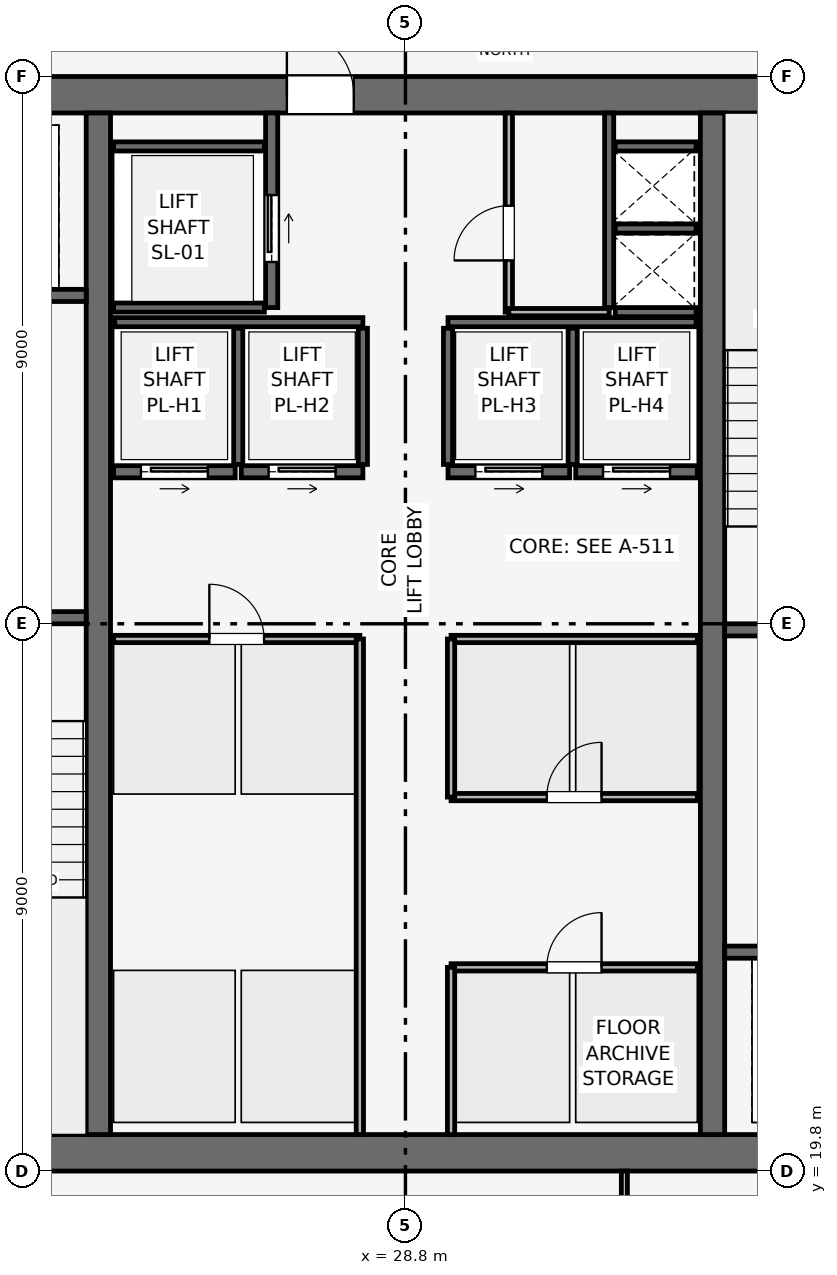
"""IFC4 building model, lengths in metres.
Left out: names, types, materials, properties, quantities, classifications, styles, units other than length and angle.
Written with IfcOpenShell. Run it as: python <this file> out.ifc"""

import sys

from ifc_helpers import new_model, si_unit, direction, frame, frame_2d, origin, place, context, subcontext, project, spatial, rectangle, extrude, element, fill, save


model = new_model("IFC4")
c1 = context("Model", 3, precision=1e-05, world=origin(), true_north=direction((0.0, 1.0)))
c2 = subcontext(c1, "Body", "Model", "MODEL_VIEW")
j1 = project(units=[si_unit("LENGTHUNIT", "METRE"), si_unit("PLANEANGLEUNIT", "RADIAN")], contexts=[c1])
p1 = place(None, origin())
s1 = spatial("IfcSite", under=j1, at=p1, CompositionType="ELEMENT")
p2 = place(p1, origin())
s2 = spatial("IfcBuilding", under=s1, at=p2, CompositionType="ELEMENT")
p3 = place(p2, frame((0.0, 0.0, 336.75)))
s3 = spatial("IfcBuildingStorey", under=s2, at=p3, CompositionType="ELEMENT", Elevation=336.75)
p4 = place(p3, frame((19.8, 20.1, 0.0), z_axis=(0.0, 0.0, 1.0), x_axis=(1.0, 0.0, 0.0)))
e1 = element("IfcWall", 1, at=p4, inside=s3, PredefinedType="SHEAR", context=c2, shape_type="SweptSolid", body=[
    extrude(rectangle(XDim=18.0, YDim=0.6, at=frame_2d((9.0, 0.0))), origin(), (0.0, 0.0, 1.0), 3.75),
])
p5 = place(p3, frame((19.8, 37.5, 0.0), z_axis=(0.0, 0.0, 1.0), x_axis=(1.0, 0.0, 0.0)))
e2 = element("IfcWall", 2, at=p5, inside=s3, PredefinedType="SHEAR", context=c2, shape_type="SweptSolid", body=[
    extrude(rectangle(XDim=18.0, YDim=0.6, at=frame_2d((9.0, 0.0))), origin(), (0.0, 0.0, 1.0), 3.75),
])
p6 = place(p5, frame((7.05, 0.0, 0.0)))
e3 = element("IfcOpeningElement", 3, at=p6, cuts=e2, PredefinedType="OPENING", context=c2, shape_type="SweptSolid", body=[
    extrude(rectangle(XDim=1.1, YDim=2.15, at=frame_2d((0.55, 1.075))), frame((0.0, 0.31, 0.0), z_axis=(0.0, -1.0, 0.0), x_axis=(1.0, 0.0, 0.0)), (0.0, 0.0, 1.0), 0.62),
])
for number, where, z_axis, x_axis in (
    (4, (23.75, 20.4, 0.0), (0.0, 0.0, 1.0), (0.0, 1.0, 0.0)),
    (5, (33.85, 20.4, 0.0), (0.0, 0.0, 1.0), (0.0, 1.0, 0.0)),
):
    element("IfcWall", number, at=place(p3, frame(where, z_axis=z_axis, x_axis=x_axis)), inside=s3, PredefinedType="SHEAR", context=c2, shape_type="SweptSolid", body=[
        extrude(rectangle(XDim=16.8, YDim=0.4, at=frame_2d((8.4, 0.0))), origin(), (0.0, 0.0, 1.0), 3.75),
    ])
p7 = place(p3, frame((20.4, 28.9, 0.0), z_axis=(0.0, 0.0, 1.0), x_axis=(1.0, 0.0, 0.0)))
e6 = element("IfcWall", 6, at=p7, inside=s3, PredefinedType="SHEAR", context=c2, shape_type="SweptSolid", body=[
    extrude(rectangle(XDim=3.15, YDim=0.2, at=frame_2d((1.575, 0.0))), origin(), (0.0, 0.0, 1.0), 3.51),
])
p8 = place(p7, frame((0.8, 0.0, 0.0)))
e7 = element("IfcOpeningElement", 7, at=p8, cuts=e6, PredefinedType="OPENING", context=c2, shape_type="SweptSolid", body=[
    extrude(rectangle(XDim=1.0, YDim=2.1, at=frame_2d((0.5, 1.05))), frame((0.0, 0.11, 0.0), z_axis=(0.0, -1.0, 0.0), x_axis=(1.0, 0.0, 0.0)), (0.0, 0.0, 1.0), 0.22),
])
p9 = place(p3, frame((34.05, 28.7, 0.0), z_axis=(0.0, 0.0, 1.0), x_axis=(1.0, 0.0, 0.0)))
e8 = element("IfcWall", 8, at=p9, inside=s3, PredefinedType="SHEAR", context=c2, shape_type="SweptSolid", body=[
    extrude(rectangle(XDim=3.15, YDim=0.2, at=frame_2d((1.575, 0.0))), origin(), (0.0, 0.0, 1.0), 3.51),
])
p10 = place(p9, frame((0.8, 0.0, 0.0)))
e9 = element("IfcOpeningElement", 9, at=p10, cuts=e8, PredefinedType="OPENING", context=c2, shape_type="SweptSolid", body=[
    extrude(rectangle(XDim=1.0, YDim=2.1, at=frame_2d((0.5, 1.05))), frame((0.0, 0.11, 0.0), z_axis=(0.0, -1.0, 0.0), x_axis=(1.0, 0.0, 0.0)), (0.0, 0.0, 1.0), 0.22),
])
p11 = place(p3, frame((32.15, 34.0, 0.0), z_axis=(0.0, 0.0, 1.0), x_axis=(0.0, 1.0, 0.0)))
e10 = element("IfcWall", 10, at=p11, inside=s3, PredefinedType="SHEAR", context=c2, shape_type="SweptSolid", body=[
    extrude(rectangle(XDim=3.2, YDim=0.15, at=frame_2d((1.6, 0.0))), origin(), (0.0, 0.0, 1.0), 3.51),
])
for number, where, z_axis, x_axis in (
    (11, (32.25, 33.925, 0.0), (0.0, 0.0, 1.0), (1.0, 0.0, 0.0)),
    (12, (32.25, 35.3, 0.0), (0.0, 0.0, 1.0), (1.0, 0.0, 0.0)),
):
    element("IfcWall", number, at=place(p3, frame(where, z_axis=z_axis, x_axis=x_axis)), inside=s3, PredefinedType="SHEAR", context=c2, shape_type="SweptSolid", body=[
        extrude(rectangle(XDim=1.33, YDim=0.15, at=frame_2d((0.665, 0.0))), origin(), (0.0, 0.0, 1.0), 3.51),
    ])
p12 = place(p3, frame((20.5, 34.2, 0.0), z_axis=(0.0, 0.0, 1.0), x_axis=(1.0, 0.0, 0.0)))
e13 = element("IfcWall", 13, at=p12, inside=s3, PredefinedType="SHEAR", context=c2, shape_type="SweptSolid", body=[
    extrude(rectangle(XDim=3.05, YDim=0.2, at=frame_2d((1.525, 0.0))), origin(), (0.0, 0.0, 1.0), 3.51),
])
p13 = place(p12, frame((0.75, 0.0, 0.0)))
e14 = element("IfcOpeningElement", 14, at=p13, cuts=e13, PredefinedType="OPENING", context=c2, shape_type="SweptSolid", body=[
    extrude(rectangle(XDim=1.1, YDim=2.15, at=frame_2d((0.55, 1.075))), frame((0.0, 0.11, 0.0), z_axis=(0.0, -1.0, 0.0), x_axis=(1.0, 0.0, 0.0)), (0.0, 0.0, 1.0), 0.22),
])
p14 = place(p3, frame((34.05, 23.4, 0.0), z_axis=(0.0, 0.0, 1.0), x_axis=(1.0, 0.0, 0.0)))
e15 = element("IfcWall", 15, at=p14, inside=s3, PredefinedType="SHEAR", context=c2, shape_type="SweptSolid", body=[
    extrude(rectangle(XDim=3.05, YDim=0.2, at=frame_2d((1.525, 0.0))), origin(), (0.0, 0.0, 1.0), 3.51),
])
p15 = place(p14, frame((1.2, 0.0, 0.0)))
e16 = element("IfcOpeningElement", 16, at=p15, cuts=e15, PredefinedType="OPENING", context=c2, shape_type="SweptSolid", body=[
    extrude(rectangle(XDim=1.1, YDim=2.15, at=frame_2d((0.55, 1.075))), frame((0.0, 0.11, 0.0), z_axis=(0.0, -1.0, 0.0), x_axis=(1.0, 0.0, 0.0)), (0.0, 0.0, 1.0), 0.22),
])
p16 = place(p3, frame((26.6, 34.0, 0.0), z_axis=(0.0, 0.0, 1.0), x_axis=(0.0, 1.0, 0.0)))
e17 = element("IfcWall", 17, at=p16, inside=s3, PredefinedType="SHEAR", context=c2, shape_type="SweptSolid", body=[
    extrude(rectangle(XDim=3.2, YDim=0.2, at=frame_2d((1.6, 0.0))), origin(), (0.0, 0.0, 1.0), 3.51),
])
p17 = place(p16, frame((0.75, 0.0, 0.0)))
e18 = element("IfcOpeningElement", 18, at=p17, cuts=e17, PredefinedType="OPENING", context=c2, shape_type="SweptSolid", body=[
    extrude(rectangle(XDim=1.1, YDim=2.15, at=frame_2d((0.55, 1.075))), frame((0.0, 0.11, 0.0), z_axis=(0.0, -1.0, 0.0), x_axis=(1.0, 0.0, 0.0)), (0.0, 0.0, 1.0), 0.22),
])
for number, where, z_axis, x_axis in (
    (19, (24.0, 34.0, 0.0), (0.0, 0.0, 1.0), (1.0, 0.0, 0.0)),
    (20, (24.0, 36.65, 0.0), (0.0, 0.0, 1.0), (1.0, 0.0, 0.0)),
):
    element("IfcWall", number, at=place(p3, frame(where, z_axis=z_axis, x_axis=x_axis)), inside=s3, PredefinedType="SHEAR", context=c2, shape_type="SweptSolid", body=[
        extrude(rectangle(XDim=2.48, YDim=0.15, at=frame_2d((1.24, 0.0))), origin(), (0.0, 0.0, 1.0), 3.51),
    ])
p18 = place(p3, frame((24.0, 31.3, 0.0), z_axis=(0.0, 0.0, 1.0), x_axis=(1.0, 0.0, 0.0)))
e21 = element("IfcWall", 21, at=p18, inside=s3, PredefinedType="SHEAR", context=c2, shape_type="SweptSolid", body=[
    extrude(rectangle(XDim=2.0, YDim=0.2, at=frame_2d((1.0, 0.0))), origin(), (0.0, 0.0, 1.0), 3.51),
])
p19 = place(p18, frame((0.45, 0.0, 0.0)))
e22 = element("IfcOpeningElement", 22, at=p19, cuts=e21, PredefinedType="OPENING", context=c2, shape_type="SweptSolid", body=[
    extrude(rectangle(XDim=1.1, YDim=2.15, at=frame_2d((0.55, 1.075))), frame((0.0, 0.11, 0.0), z_axis=(0.0, -1.0, 0.0), x_axis=(1.0, 0.0, 0.0)), (0.0, 0.0, 1.0), 0.22),
])
p20 = place(p3, frame((26.1, 31.3, 0.0), z_axis=(0.0, 0.0, 1.0), x_axis=(1.0, 0.0, 0.0)))
e23 = element("IfcWall", 23, at=p20, inside=s3, PredefinedType="SHEAR", context=c2, shape_type="SweptSolid", body=[
    extrude(rectangle(XDim=2.0, YDim=0.2, at=frame_2d((1.0, 0.0))), origin(), (0.0, 0.0, 1.0), 3.51),
])
p21 = place(p20, frame((0.45, 0.0, 0.0)))
e24 = element("IfcOpeningElement", 24, at=p21, cuts=e23, PredefinedType="OPENING", context=c2, shape_type="SweptSolid", body=[
    extrude(rectangle(XDim=1.1, YDim=2.15, at=frame_2d((0.55, 1.075))), frame((0.0, 0.11, 0.0), z_axis=(0.0, -1.0, 0.0), x_axis=(1.0, 0.0, 0.0)), (0.0, 0.0, 1.0), 0.22),
])
p22 = place(p3, frame((29.5, 31.3, 0.0), z_axis=(0.0, 0.0, 1.0), x_axis=(1.0, 0.0, 0.0)))
e25 = element("IfcWall", 25, at=p22, inside=s3, PredefinedType="SHEAR", context=c2, shape_type="SweptSolid", body=[
    extrude(rectangle(XDim=2.0, YDim=0.2, at=frame_2d((1.0, 0.0))), origin(), (0.0, 0.0, 1.0), 3.51),
])
p23 = place(p22, frame((0.45, 0.0, 0.0)))
e26 = element("IfcOpeningElement", 26, at=p23, cuts=e25, PredefinedType="OPENING", context=c2, shape_type="SweptSolid", body=[
    extrude(rectangle(XDim=1.1, YDim=2.15, at=frame_2d((0.55, 1.075))), frame((0.0, 0.11, 0.0), z_axis=(0.0, -1.0, 0.0), x_axis=(1.0, 0.0, 0.0)), (0.0, 0.0, 1.0), 0.22),
])
p24 = place(p3, frame((31.6, 31.3, 0.0), z_axis=(0.0, 0.0, 1.0), x_axis=(1.0, 0.0, 0.0)))
e27 = element("IfcWall", 27, at=p24, inside=s3, PredefinedType="SHEAR", context=c2, shape_type="SweptSolid", body=[
    extrude(rectangle(XDim=2.0, YDim=0.2, at=frame_2d((1.0, 0.0))), origin(), (0.0, 0.0, 1.0), 3.51),
])
p25 = place(p24, frame((0.45, 0.0, 0.0)))
e28 = element("IfcOpeningElement", 28, at=p25, cuts=e27, PredefinedType="OPENING", context=c2, shape_type="SweptSolid", body=[
    extrude(rectangle(XDim=1.1, YDim=2.15, at=frame_2d((0.55, 1.075))), frame((0.0, 0.11, 0.0), z_axis=(0.0, -1.0, 0.0), x_axis=(1.0, 0.0, 0.0)), (0.0, 0.0, 1.0), 0.22),
])
p26 = place(p3, frame((32.25, 36.65, 0.0), z_axis=(0.0, 0.0, 1.0), x_axis=(1.0, 0.0, 0.0)))
e29 = element("IfcWall", 29, at=p26, inside=s3, PredefinedType="SHEAR", context=c2, shape_type="SweptSolid", body=[
    extrude(rectangle(XDim=1.33, YDim=0.15, at=frame_2d((0.665, 0.0))), origin(), (0.0, 0.0, 1.0), 3.51),
])
for number, where, z_axis, x_axis in (
    (30, (24.02, 33.76, 0.0), (0.0, 0.0, 1.0), (1.0, 0.0, 0.0)),
    (31, (29.5, 33.76, 0.0), (0.0, 0.0, 1.0), (1.0, 0.0, 0.0)),
):
    element("IfcWall", number, at=place(p3, frame(where, z_axis=z_axis, x_axis=x_axis)), inside=s3, PredefinedType="SHEAR", context=c2, shape_type="SweptSolid", body=[
        extrude(rectangle(XDim=4.08, YDim=0.15, at=frame_2d((2.04, 0.0))), origin(), (0.0, 0.0, 1.0), 3.51),
    ])
for number, where, z_axis, x_axis in (
    (32, (26.05, 31.42, 0.0), (0.0, 0.0, 1.0), (0.0, 1.0, 0.0)),
    (33, (28.1, 31.42, 0.0), (0.0, 0.0, 1.0), (0.0, 1.0, 0.0)),
    (34, (29.5, 31.42, 0.0), (0.0, 0.0, 1.0), (0.0, 1.0, 0.0)),
    (35, (31.55, 31.42, 0.0), (0.0, 0.0, 1.0), (0.0, 1.0, 0.0)),
):
    element("IfcWall", number, at=place(p3, frame(where, z_axis=z_axis, x_axis=x_axis)), inside=s3, PredefinedType="SHEAR", context=c2, shape_type="SweptSolid", body=[
        extrude(rectangle(XDim=2.24, YDim=0.15, at=frame_2d((1.12, 0.0))), origin(), (0.0, 0.0, 1.0), 3.51),
    ])
p27 = place(p3, frame((30.5, 33.925, 0.0), z_axis=(0.0, 0.0, 1.0), x_axis=(0.0, 1.0, 0.0)))
e36 = element("IfcWall", 36, at=p27, inside=s3, PredefinedType="PARTITIONING", context=c2, shape_type="SweptSolid", body=[
    extrude(rectangle(XDim=3.275, YDim=0.12, at=frame_2d((1.637, 0.0))), origin(), (0.0, 0.0, 1.0), 3.51),
])
p28 = place(p27, frame((0.85, 0.0, 0.0)))
e37 = element("IfcOpeningElement", 37, at=p28, cuts=e36, PredefinedType="OPENING", context=c2, shape_type="SweptSolid", body=[
    extrude(rectangle(XDim=0.9, YDim=2.1, at=frame_2d((0.45, 1.05))), frame((0.0, 0.07, 0.0), z_axis=(0.0, -1.0, 0.0), x_axis=(1.0, 0.0, 0.0)), (0.0, 0.0, 1.0), 0.14),
])
p29 = place(p3, frame((30.5, 33.925, 0.0), z_axis=(0.0, 0.0, 1.0), x_axis=(1.0, 0.0, 0.0)))
e38 = element("IfcWall", 38, at=p29, inside=s3, PredefinedType="PARTITIONING", context=c2, shape_type="SweptSolid", body=[
    extrude(rectangle(XDim=1.65, YDim=0.12, at=frame_2d((0.825, 0.0))), origin(), (0.0, 0.0, 1.0), 3.51),
])
p30 = place(p3, frame((24.0, 28.55, 0.0), z_axis=(0.0, 0.0, 1.0), x_axis=(1.0, 0.0, 0.0)))
e39 = element("IfcWall", 39, at=p30, inside=s3, PredefinedType="PARTITIONING", context=c2, shape_type="SweptSolid", body=[
    extrude(rectangle(XDim=4.05, YDim=0.12, at=frame_2d((2.025, 0.0))), origin(), (0.0, 0.0, 1.0), 3.51),
])
p31 = place(p30, frame((1.575, 0.0, 0.0)))
e40 = element("IfcOpeningElement", 40, at=p31, cuts=e39, PredefinedType="OPENING", context=c2, shape_type="SweptSolid", body=[
    extrude(rectangle(XDim=0.9, YDim=2.1, at=frame_2d((0.45, 1.05))), frame((0.0, 0.07, 0.0), z_axis=(0.0, -1.0, 0.0), x_axis=(1.0, 0.0, 0.0)), (0.0, 0.0, 1.0), 0.14),
])
p32 = place(p3, frame((28.05, 20.4, 0.0), z_axis=(0.0, 0.0, 1.0), x_axis=(0.0, 1.0, 0.0)))
e41 = element("IfcWall", 41, at=p32, inside=s3, PredefinedType="PARTITIONING", context=c2, shape_type="SweptSolid", body=[
    extrude(rectangle(XDim=8.15, YDim=0.12, at=frame_2d((4.075, 0.0))), origin(), (0.0, 0.0, 1.0), 3.51),
])
p33 = place(p3, frame((29.55, 23.15, 0.0), z_axis=(0.0, 0.0, 1.0), x_axis=(1.0, 0.0, 0.0)))
e42 = element("IfcWall", 42, at=p33, inside=s3, PredefinedType="PARTITIONING", context=c2, shape_type="SweptSolid", body=[
    extrude(rectangle(XDim=4.05, YDim=0.12, at=frame_2d((2.025, 0.0))), origin(), (0.0, 0.0, 1.0), 3.51),
])
p34 = place(p33, frame((1.575, 0.0, 0.0)))
e43 = element("IfcOpeningElement", 43, at=p34, cuts=e42, PredefinedType="OPENING", context=c2, shape_type="SweptSolid", body=[
    extrude(rectangle(XDim=0.9, YDim=2.1, at=frame_2d((0.45, 1.05))), frame((0.0, 0.07, 0.0), z_axis=(0.0, -1.0, 0.0), x_axis=(1.0, 0.0, 0.0)), (0.0, 0.0, 1.0), 0.14),
])
p35 = place(p3, frame((29.55, 20.4, 0.0), z_axis=(0.0, 0.0, 1.0), x_axis=(0.0, 1.0, 0.0)))
e44 = element("IfcWall", 44, at=p35, inside=s3, PredefinedType="PARTITIONING", context=c2, shape_type="SweptSolid", body=[
    extrude(rectangle(XDim=2.75, YDim=0.12, at=frame_2d((1.375, 0.0))), origin(), (0.0, 0.0, 1.0), 3.51),
])
p36 = place(p3, frame((29.55, 25.95, 0.0), z_axis=(0.0, 0.0, 1.0), x_axis=(1.0, 0.0, 0.0)))
e45 = element("IfcWall", 45, at=p36, inside=s3, PredefinedType="PARTITIONING", context=c2, shape_type="SweptSolid", body=[
    extrude(rectangle(XDim=4.05, YDim=0.12, at=frame_2d((2.025, 0.0))), origin(), (0.0, 0.0, 1.0), 3.51),
])
p37 = place(p36, frame((1.575, 0.0, 0.0)))
e46 = element("IfcOpeningElement", 46, at=p37, cuts=e45, PredefinedType="OPENING", context=c2, shape_type="SweptSolid", body=[
    extrude(rectangle(XDim=0.9, YDim=2.1, at=frame_2d((0.45, 1.05))), frame((0.0, 0.07, 0.0), z_axis=(0.0, -1.0, 0.0), x_axis=(1.0, 0.0, 0.0)), (0.0, 0.0, 1.0), 0.14),
])
p38 = place(p3, frame((29.55, 28.55, 0.0), z_axis=(0.0, 0.0, 1.0), x_axis=(1.0, 0.0, 0.0)))
e47 = element("IfcWall", 47, at=p38, inside=s3, PredefinedType="PARTITIONING", context=c2, shape_type="SweptSolid", body=[
    extrude(rectangle(XDim=4.05, YDim=0.12, at=frame_2d((2.025, 0.0))), origin(), (0.0, 0.0, 1.0), 3.51),
])
p39 = place(p3, frame((29.55, 25.95, 0.0), z_axis=(0.0, 0.0, 1.0), x_axis=(0.0, 1.0, 0.0)))
e48 = element("IfcWall", 48, at=p39, inside=s3, PredefinedType="PARTITIONING", context=c2, shape_type="SweptSolid", body=[
    extrude(rectangle(XDim=2.6, YDim=0.12, at=frame_2d((1.3, 0.0))), origin(), (0.0, 0.0, 1.0), 3.51),
])
p40 = place(p3, frame((32.4, 6.73, 0.0), z_axis=(0.0, 0.0, 1.0), x_axis=(0.0, 1.0, 0.0)))
e49 = element("IfcWall", 49, at=p40, inside=s3, PredefinedType="MOVABLE", context=c2, shape_type="SweptSolid", body=[
    extrude(rectangle(XDim=13.07, YDim=0.1, at=frame_2d((6.535, 0.0))), origin(), (0.0, 0.0, 1.0), 3.135),
])
p41 = place(p40, frame((10.67, 0.0, 0.0)))
e50 = element("IfcOpeningElement", 50, at=p41, cuts=e49, PredefinedType="OPENING", context=c2, shape_type="SweptSolid", body=[
    extrude(rectangle(XDim=0.9, YDim=2.1, at=frame_2d((0.45, 1.05))), frame((0.0, 0.06, 0.0), z_axis=(0.0, -1.0, 0.0), x_axis=(1.0, 0.0, 0.0)), (0.0, 0.0, 1.0), 0.12),
])
p42 = place(p17, origin())
e51 = element("IfcDoor", 51, at=p42, inside=s3, OperationType="SLIDING_TO_RIGHT", PredefinedType="DOOR", context=c2, shape_type="SweptSolid", body=[
    extrude(rectangle(XDim=1.1, YDim=2.15, at=frame_2d((0.55, 1.075))), frame((0.0, 0.025, 0.0), z_axis=(0.0, -1.0, 0.0), x_axis=(1.0, 0.0, 0.0)), (0.0, 0.0, 1.0), 0.05),
])
fill(e18, e51)
p43 = place(p19, origin())
e52 = element("IfcDoor", 52, at=p43, inside=s3, OperationType="SLIDING_TO_RIGHT", PredefinedType="DOOR", context=c2, shape_type="SweptSolid", body=[
    extrude(rectangle(XDim=1.1, YDim=2.15, at=frame_2d((0.55, 1.075))), frame((0.0, 0.025, 0.0), z_axis=(0.0, -1.0, 0.0), x_axis=(1.0, 0.0, 0.0)), (0.0, 0.0, 1.0), 0.05),
])
fill(e22, e52)
p44 = place(p21, origin())
e53 = element("IfcDoor", 53, at=p44, inside=s3, OperationType="SLIDING_TO_RIGHT", PredefinedType="DOOR", context=c2, shape_type="SweptSolid", body=[
    extrude(rectangle(XDim=1.1, YDim=2.15, at=frame_2d((0.55, 1.075))), frame((0.0, 0.025, 0.0), z_axis=(0.0, -1.0, 0.0), x_axis=(1.0, 0.0, 0.0)), (0.0, 0.0, 1.0), 0.05),
])
fill(e24, e53)
p45 = place(p23, origin())
e54 = element("IfcDoor", 54, at=p45, inside=s3, OperationType="SLIDING_TO_RIGHT", PredefinedType="DOOR", context=c2, shape_type="SweptSolid", body=[
    extrude(rectangle(XDim=1.1, YDim=2.15, at=frame_2d((0.55, 1.075))), frame((0.0, 0.025, 0.0), z_axis=(0.0, -1.0, 0.0), x_axis=(1.0, 0.0, 0.0)), (0.0, 0.0, 1.0), 0.05),
])
fill(e26, e54)
p46 = place(p25, origin())
e55 = element("IfcDoor", 55, at=p46, inside=s3, OperationType="SLIDING_TO_RIGHT", PredefinedType="DOOR", context=c2, shape_type="SweptSolid", body=[
    extrude(rectangle(XDim=1.1, YDim=2.15, at=frame_2d((0.55, 1.075))), frame((0.0, 0.025, 0.0), z_axis=(0.0, -1.0, 0.0), x_axis=(1.0, 0.0, 0.0)), (0.0, 0.0, 1.0), 0.05),
])
fill(e28, e55)
p47 = place(p28, origin())
e56 = element("IfcDoor", 56, at=p47, inside=s3, OperationType="SINGLE_SWING_LEFT", PredefinedType="DOOR", context=c2, shape_type="SweptSolid", body=[
    extrude(rectangle(XDim=0.9, YDim=2.1, at=frame_2d((0.45, 1.05))), frame((0.0, 0.025, 0.0), z_axis=(0.0, -1.0, 0.0), x_axis=(1.0, 0.0, 0.0)), (0.0, 0.0, 1.0), 0.05),
])
fill(e37, e56)
p48 = place(p31, origin())
e57 = element("IfcDoor", 57, at=p48, inside=s3, OperationType="SINGLE_SWING_LEFT", PredefinedType="DOOR", context=c2, shape_type="SweptSolid", body=[
    extrude(rectangle(XDim=0.9, YDim=2.1, at=frame_2d((0.45, 1.05))), frame((0.0, 0.025, 0.0), z_axis=(0.0, -1.0, 0.0), x_axis=(1.0, 0.0, 0.0)), (0.0, 0.0, 1.0), 0.05),
])
fill(e40, e57)
p49 = place(p34, origin())
e58 = element("IfcDoor", 58, at=p49, inside=s3, OperationType="SINGLE_SWING_RIGHT", PredefinedType="DOOR", context=c2, shape_type="SweptSolid", body=[
    extrude(rectangle(XDim=0.9, YDim=2.1, at=frame_2d((0.45, 1.05))), frame((0.0, 0.025, 0.0), z_axis=(0.0, -1.0, 0.0), x_axis=(1.0, 0.0, 0.0)), (0.0, 0.0, 1.0), 0.05),
])
fill(e43, e58)
p50 = place(p37, origin())
e59 = element("IfcDoor", 59, at=p50, inside=s3, OperationType="SINGLE_SWING_RIGHT", PredefinedType="DOOR", context=c2, shape_type="SweptSolid", body=[
    extrude(rectangle(XDim=0.9, YDim=2.1, at=frame_2d((0.45, 1.05))), frame((0.0, 0.025, 0.0), z_axis=(0.0, -1.0, 0.0), x_axis=(1.0, 0.0, 0.0)), (0.0, 0.0, 1.0), 0.05),
])
fill(e46, e59)
p51 = place(p6, origin())
e60 = element("IfcDoor", 60, at=p51, inside=s3, OperationType="SINGLE_SWING_LEFT", PredefinedType="DOOR", context=c2, shape_type="SweptSolid", body=[
    extrude(rectangle(XDim=1.1, YDim=2.15, at=frame_2d((0.55, 1.075))), frame((0.0, 0.025, 0.0), z_axis=(0.0, -1.0, 0.0), x_axis=(1.0, 0.0, 0.0)), (0.0, 0.0, 1.0), 0.05),
])
fill(e3, e60)
save(model, sys.argv[1])
